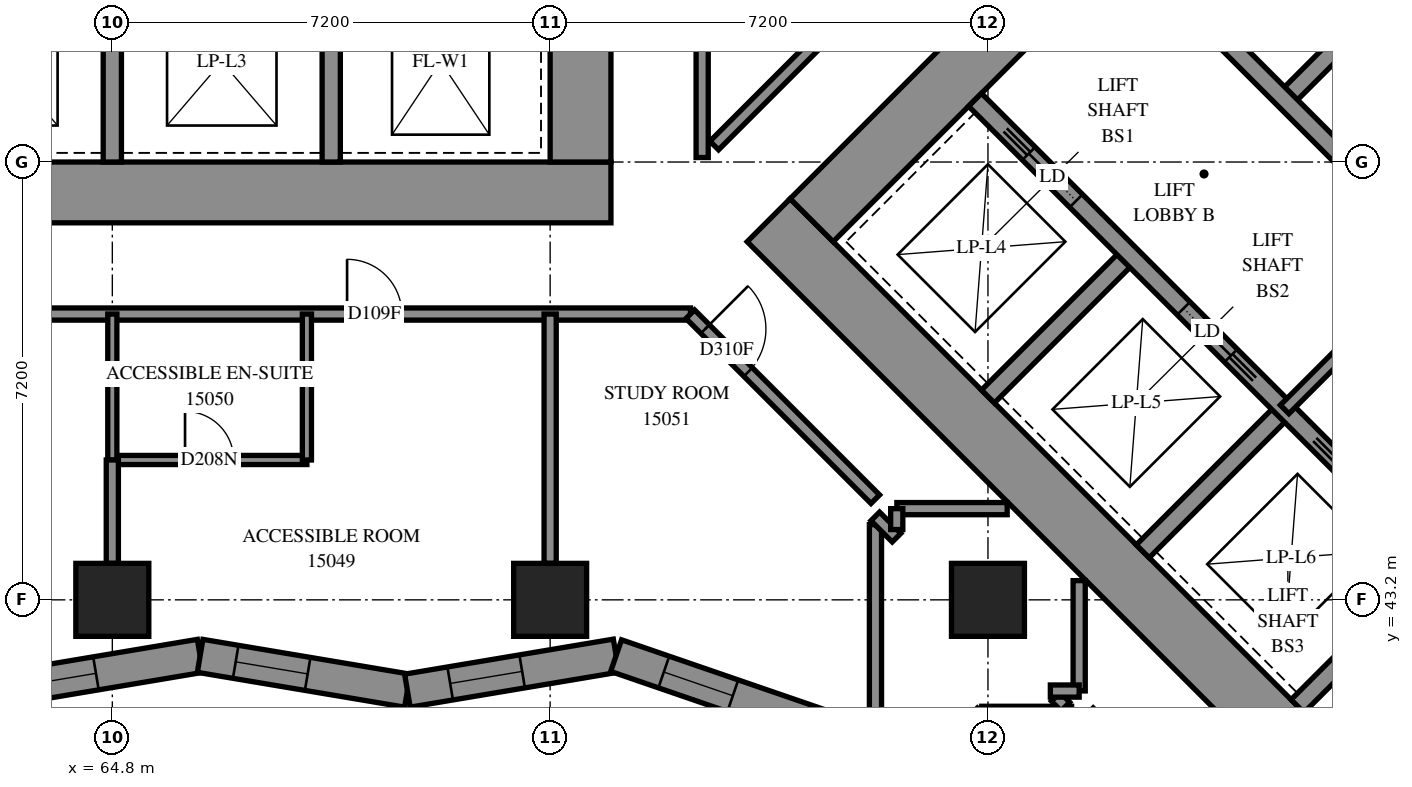
"""IFC4 building model, lengths in metres.
Left out: names, types, materials, properties, quantities, classifications, styles, units other than length and angle.
Written with IfcOpenShell. Run it as: python <this file> out.ifc"""

import sys

from ifc_helpers import new_model, si_unit, direction, frame, frame_2d, origin, origin_2d, place, context, subcontext, project, spatial, polyline, rectangle, outline, extrude, element, fill, save


model = new_model("IFC4")
c1 = context("Model", 3, precision=1e-05, world=origin(), true_north=direction((0.0, 1.0)))
c2 = subcontext(c1, "Body", "Model", "MODEL_VIEW")
j1 = project(units=[si_unit("LENGTHUNIT", "METRE"), si_unit("PLANEANGLEUNIT", "RADIAN")], contexts=[c1])
p1 = place(None, origin())
s1 = spatial("IfcSite", under=j1, at=p1, CompositionType="ELEMENT")
p2 = place(p1, origin())
s2 = spatial("IfcBuilding", under=s1, at=p2, CompositionType="ELEMENT")
p3 = place(p2, frame((0.0, 0.0, 57.6)))
s3 = spatial("IfcBuildingStorey", under=s2, at=p3, CompositionType="ELEMENT", Elevation=57.6)
for number, where, z_axis, x_axis in (
    (1, (64.8, 43.2, 0.0), (0.0, 0.0, 1.0), (1.0, 0.0, 0.0)),
    (2, (72.0, 43.2, 0.0), (0.0, 0.0, 1.0), (1.0, 0.0, 0.0)),
    (3, (79.2, 43.2, 0.0), (0.0, 0.0, 1.0), (1.0, 0.0, 0.0)),
):
    element("IfcColumn", number, at=place(p3, frame(where, z_axis=z_axis, x_axis=x_axis)), inside=s3, PredefinedType="COLUMN", context=c2, shape_type="SweptSolid", body=[
        extrude(rectangle(XDim=1.2, YDim=1.2, at=origin_2d()), origin(), (0.0, 0.0, 1.0), 3.1),
    ])
p4 = place(p3, frame((56.6, 49.9, -0.3), z_axis=(0.0, 0.0, 1.0), x_axis=(1.0, 0.0, 0.0)))
e4 = element("IfcWall", 4, at=p4, inside=s3, PredefinedType="SHEAR", context=c2, shape_type="SweptSolid", body=[
    extrude(rectangle(XDim=16.4, YDim=1.0, at=frame_2d((8.2, 0.0))), origin(), (0.0, 0.0, 1.0), 2.7),
])
p5 = place(p3, frame((72.5, 50.4, -0.3), z_axis=(0.0, 0.0, 1.0), x_axis=(0.0, 1.0, 0.0)))
e5 = element("IfcWall", 5, at=p5, inside=s3, PredefinedType="SHEAR", context=c2, shape_type="SweptSolid", body=[
    extrude(rectangle(XDim=14.4, YDim=1.0, at=frame_2d((7.2, 0.0))), origin(), (0.0, 0.0, 1.0), 2.7),
])
p6 = place(p5, frame((4.55, 0.0, 0.3)))
e6 = element("IfcOpeningElement", 6, at=p6, cuts=e5, PredefinedType="OPENING", context=c2, shape_type="SweptSolid", body=[
    extrude(rectangle(XDim=1.1, YDim=2.1, at=frame_2d((0.55, 1.05))), frame((0.0, 0.51, 0.0), z_axis=(0.0, -1.0, 0.0), x_axis=(1.0, 0.0, 0.0)), (0.0, 0.0, 1.0), 1.02),
])
p7 = place(p5, frame((11.35, 0.0, 0.3)))
e7 = element("IfcOpeningElement", 7, at=p7, cuts=e5, PredefinedType="OPENING", context=c2, shape_type="SweptSolid", body=[
    extrude(rectangle(XDim=1.1, YDim=2.1, at=frame_2d((0.55, 1.05))), frame((0.0, 0.51, 0.0), z_axis=(0.0, -1.0, 0.0), x_axis=(1.0, 0.0, 0.0)), (0.0, 0.0, 1.0), 1.02),
])
for number, where, z_axis, x_axis in (
    (8, (64.8, 50.4, 0.0), (0.0, 0.0, 1.0), (0.0, 1.0, 0.0)),
    (9, (68.4, 50.4, 0.0), (0.0, 0.0, 1.0), (0.0, 1.0, 0.0)),
):
    element("IfcWall", number, at=place(p3, frame(where, z_axis=z_axis, x_axis=x_axis)), inside=s3, PredefinedType="SOLIDWALL", context=c2, shape_type="SweptSolid", body=[
        extrude(rectangle(XDim=3.3, YDim=0.3, at=frame_2d((1.65, 0.0))), origin(), (0.0, 0.0, 1.0), 3.1),
    ])
p8 = place(p3, frame((75.594, 49.443, -0.3), z_axis=(0.0, 0.0, 1.0), x_axis=(0.7071037324, -0.70710983, 0.0)))
e10 = element("IfcWall", 10, at=p8, inside=s3, PredefinedType="SHEAR", context=c2, shape_type="SweptSolid", body=[
    extrude(rectangle(XDim=16.4, YDim=1.0, at=frame_2d((8.2, 0.0))), origin(), (0.0, 0.0, 1.0), 2.7),
])
p9 = place(p3, frame((76.301, 49.443, -0.3), z_axis=(0.0, 0.0, 1.0), x_axis=(0.7071067812, 0.7071067812, 0.0)))
e11 = element("IfcWall", 11, at=p9, inside=s3, PredefinedType="SHEAR", context=c2, shape_type="SweptSolid", body=[
    extrude(rectangle(XDim=14.4, YDim=1.0, at=frame_2d((7.2, 0.0))), origin(), (0.0, 0.0, 1.0), 2.7),
])
p10 = place(p9, frame((4.55, 0.0, 0.3)))
e12 = element("IfcOpeningElement", 12, at=p10, cuts=e11, PredefinedType="OPENING", context=c2, shape_type="SweptSolid", body=[
    extrude(rectangle(XDim=1.1, YDim=2.1, at=frame_2d((0.55, 1.05))), frame((0.0, 0.51, 0.0), z_axis=(0.0, -1.0, 0.0), x_axis=(1.0, 0.0, 0.0)), (0.0, 0.0, 1.0), 1.02),
])
p11 = place(p9, frame((11.35, 0.0, 0.3)))
e13 = element("IfcOpeningElement", 13, at=p11, cuts=e11, PredefinedType="OPENING", context=c2, shape_type="SweptSolid", body=[
    extrude(rectangle(XDim=1.1, YDim=2.1, at=frame_2d((0.55, 1.05))), frame((0.0, 0.51, 0.0), z_axis=(0.0, -1.0, 0.0), x_axis=(1.0, 0.0, 0.0)), (0.0, 0.0, 1.0), 1.02),
])
for number, where, z_axis, x_axis in (
    (14, (79.2, 46.544, 0.0), (0.0, 0.0, 1.0), (0.707, 0.707, 0.0)),
    (15, (84.079, 51.423, 0.0), (0.0, 0.0, 1.0), (0.707, 0.707, 0.0)),
):
    element("IfcWall", number, at=place(p3, frame(where, z_axis=z_axis, x_axis=x_axis)), inside=s3, PredefinedType="SOLIDWALL", context=c2, shape_type="SweptSolid", body=[
        extrude(rectangle(XDim=3.3, YDim=0.3, at=frame_2d((1.65, 0.0))), origin(), (0.0, 0.0, 1.0), 3.1),
    ])
for number, where, z_axis, x_axis in (
    (16, (81.746, 43.999, 0.0), (0.0, 0.0, 1.0), (0.707, 0.707, 0.0)),
    (17, (84.291, 41.453, 0.0), (0.0, 0.0, 1.0), (0.707, 0.707, 0.0)),
):
    element("IfcWall", number, at=place(p3, frame(where, z_axis=z_axis, x_axis=x_axis)), inside=s3, PredefinedType="SOLIDWALL", context=c2, shape_type="SweptSolid", body=[
        extrude(rectangle(XDim=3.3, YDim=0.3, at=frame_2d((1.65, 0.0))), origin(), (0.0, 0.0, 1.0), 3.1),
    ])
p12 = place(p3, frame((78.988, 51.423, 0.0), z_axis=(0.0, 0.0, 1.0), x_axis=(0.7071067812, -0.7071067812, 0.0)))
e18 = element("IfcWall", 18, at=p12, inside=s3, PredefinedType="SOLIDWALL", context=c2, shape_type="SweptSolid", body=[
    extrude(rectangle(XDim=14.4, YDim=0.3, at=frame_2d((7.2, 0.0))), origin(), (0.0, 0.0, 1.0), 3.1),
])
p13 = place(p12, frame((1.25, 0.0, 0.0)))
e19 = element("IfcOpeningElement", 19, at=p13, cuts=e18, PredefinedType="OPENING", context=c2, shape_type="SweptSolid", body=[
    extrude(rectangle(XDim=1.1, YDim=2.1, at=frame_2d((0.55, 1.05))), frame((0.0, 0.16, 0.0), z_axis=(0.0, -1.0, 0.0), x_axis=(1.0, 0.0, 0.0)), (0.0, 0.0, 1.0), 0.32),
])
p14 = place(p12, frame((4.85, 0.0, 0.0)))
e20 = element("IfcOpeningElement", 20, at=p14, cuts=e18, PredefinedType="OPENING", context=c2, shape_type="SweptSolid", body=[
    extrude(rectangle(XDim=1.1, YDim=2.1, at=frame_2d((0.55, 1.05))), frame((0.0, 0.16, 0.0), z_axis=(0.0, -1.0, 0.0), x_axis=(1.0, 0.0, 0.0)), (0.0, 0.0, 1.0), 0.32),
])
p15 = place(p12, frame((8.45, 0.0, 0.0)))
e21 = element("IfcOpeningElement", 21, at=p15, cuts=e18, PredefinedType="OPENING", context=c2, shape_type="SweptSolid", body=[
    extrude(rectangle(XDim=1.1, YDim=2.1, at=frame_2d((0.55, 1.05))), frame((0.0, 0.16, 0.0), z_axis=(0.0, -1.0, 0.0), x_axis=(1.0, 0.0, 0.0)), (0.0, 0.0, 1.0), 0.32),
])
p16 = place(p12, frame((12.05, 0.0, 0.0)))
e22 = element("IfcOpeningElement", 22, at=p16, cuts=e18, PredefinedType="OPENING", context=c2, shape_type="SweptSolid", body=[
    extrude(rectangle(XDim=1.1, YDim=2.1, at=frame_2d((0.55, 1.05))), frame((0.0, 0.16, 0.0), z_axis=(0.0, -1.0, 0.0), x_axis=(1.0, 0.0, 0.0)), (0.0, 0.0, 1.0), 0.32),
])
p17 = place(p3, frame((81.534, 53.969, 0.0), z_axis=(0.0, 0.0, 1.0), x_axis=(0.707103309, -0.7071102534, 0.0)))
e23 = element("IfcWall", 23, at=p17, inside=s3, PredefinedType="SOLIDWALL", context=c2, shape_type="SweptSolid", body=[
    extrude(rectangle(XDim=14.4, YDim=0.3, at=frame_2d((7.2, 0.0))), origin(), (0.0, 0.0, 1.0), 3.1),
])
p18 = place(p17, frame((12.05, 0.0, 0.0)))
e24 = element("IfcOpeningElement", 24, at=p18, cuts=e23, PredefinedType="OPENING", context=c2, shape_type="SweptSolid", body=[
    extrude(rectangle(XDim=1.1, YDim=2.1, at=frame_2d((0.55, 1.05))), frame((0.0, 0.16, 0.0), z_axis=(0.0, -1.0, 0.0), x_axis=(1.0, 0.0, 0.0)), (0.0, 0.0, 1.0), 0.32),
])
p19 = place(p3, frame((83.867, 56.302, 0.0), z_axis=(0.0, 0.0, 1.0), x_axis=(0.7071137256, -0.7070998367, 0.0)))
e25 = element("IfcWall", 25, at=p19, inside=s3, PredefinedType="SOLIDWALL", context=c2, shape_type="SweptSolid", body=[
    extrude(rectangle(XDim=7.2, YDim=0.3, at=frame_2d((3.6, 0.0))), origin(), (0.0, 0.0, 1.0), 3.1),
])
p20 = place(p3, frame((62.835, 41.707, 0.0), z_axis=(0.0, 0.0, 1.0), x_axis=(0.9862119159, 0.1654873316, 0.0)))
e26 = element("IfcWall", 26, at=p20, inside=s3, PredefinedType="SOLIDWALL", context=c2, shape_type="SweptSolid", body=[
    extrude(outline(polyline([(-0.046, -0.275), (3.41, -0.275), (3.503, 0.275), (0.046, 0.275), (-0.046, -0.275)])), origin(), (0.0, 0.0, 1.0), 3.1),
])
p21 = place(p20, frame((0.519, 0.0, 0.5)))
e27 = element("IfcOpeningElement", 27, at=p21, cuts=e26, PredefinedType="OPENING", context=c2, shape_type="SweptSolid", body=[
    extrude(rectangle(XDim=1.2, YDim=2.45, at=frame_2d((0.6, 1.225))), frame((0.0, 0.285, 0.0), z_axis=(0.0, -1.0, 0.0), x_axis=(1.0, 0.0, 0.0)), (0.0, 0.0, 1.0), 0.57),
])
p22 = place(p3, frame((66.244, 42.279, 0.0), z_axis=(0.0, 0.0, 1.0), x_axis=(0.9862119159, -0.1654873316, 0.0)))
e28 = element("IfcWall", 28, at=p22, inside=s3, PredefinedType="SOLIDWALL", context=c2, shape_type="SweptSolid", body=[
    extrude(outline(polyline([(0.046, -0.275), (3.503, -0.275), (3.41, 0.275), (-0.046, 0.275), (0.046, -0.275)])), origin(), (0.0, 0.0, 1.0), 3.1),
])
p23 = place(p22, frame((0.593, 0.0, 0.5)))
e29 = element("IfcOpeningElement", 29, at=p23, cuts=e28, PredefinedType="OPENING", context=c2, shape_type="SweptSolid", body=[
    extrude(rectangle(XDim=1.2, YDim=2.45, at=frame_2d((0.6, 1.225))), frame((0.0, 0.285, 0.0), z_axis=(0.0, -1.0, 0.0), x_axis=(1.0, 0.0, 0.0)), (0.0, 0.0, 1.0), 0.57),
])
p24 = place(p3, frame((69.653, 41.707, 0.0), z_axis=(0.0, 0.0, 1.0), x_axis=(0.9862084709, 0.1655078606, 0.0)))
e30 = element("IfcWall", 30, at=p24, inside=s3, PredefinedType="SOLIDWALL", context=c2, shape_type="SweptSolid", body=[
    extrude(outline(polyline([(-0.046, -0.275), (3.41, -0.275), (3.55, 0.275), (0.046, 0.275), (-0.046, -0.275)])), origin(), (0.0, 0.0, 1.0), 3.1),
])
p25 = place(p24, frame((0.713, 0.0, 0.5)))
e31 = element("IfcOpeningElement", 31, at=p25, cuts=e30, PredefinedType="OPENING", context=c2, shape_type="SweptSolid", body=[
    extrude(rectangle(XDim=1.2, YDim=2.45, at=frame_2d((0.6, 1.225))), frame((0.0, 0.285, 0.0), z_axis=(0.0, -1.0, 0.0), x_axis=(1.0, 0.0, 0.0)), (0.0, 0.0, 1.0), 0.57),
])
p26 = place(p3, frame((73.085, 42.283, 0.0), z_axis=(0.0, 0.0, 1.0), x_axis=(0.9456655462, -0.3251410075, 0.0)))
e32 = element("IfcWall", 32, at=p26, inside=s3, PredefinedType="SOLIDWALL", context=c2, shape_type="SweptSolid", body=[
    extrude(outline(polyline([(0.07, -0.275), (3.675, -0.275), (3.719, 0.275), (-0.07, 0.275), (0.07, -0.275)])), origin(), (0.0, 0.0, 1.0), 3.1),
])
p27 = place(p26, frame((0.83, 0.0, 0.5)))
e33 = element("IfcOpeningElement", 33, at=p27, cuts=e32, PredefinedType="OPENING", context=c2, shape_type="SweptSolid", body=[
    extrude(rectangle(XDim=1.2, YDim=2.45, at=frame_2d((0.6, 1.225))), frame((0.0, 0.285, 0.0), z_axis=(0.0, -1.0, 0.0), x_axis=(1.0, 0.0, 0.0)), (0.0, 0.0, 1.0), 0.57),
])
p28 = place(p3, frame((84.079, 46.332, 0.0), z_axis=(0.0, 0.0, 1.0), x_axis=(0.7071067812, 0.7071067812, 0.0)))
e34 = element("IfcWall", 34, at=p28, inside=s3, PredefinedType="PARTITIONING", context=c2, shape_type="SweptSolid", body=[
    extrude(rectangle(XDim=3.6, YDim=0.2, at=frame_2d((1.8, 0.0))), origin(), (0.0, 0.0, 1.0), 3.1),
])
p29 = place(p3, frame((55.1, 47.9, 0.0), z_axis=(0.0, 0.0, 1.0), x_axis=(1.0, 0.0, 0.0)))
e35 = element("IfcWall", 35, at=p29, inside=s3, PredefinedType="PARTITIONING", context=c2, shape_type="SweptSolid", body=[
    extrude(rectangle(XDim=19.208, YDim=0.2, at=frame_2d((9.604, 0.0))), origin(), (0.0, 0.0, 1.0), 3.1),
])
p30 = place(p29, frame((6.399, 0.0, 0.0)))
e36 = element("IfcOpeningElement", 36, at=p30, cuts=e35, PredefinedType="OPENING", context=c2, shape_type="SweptSolid", body=[
    extrude(rectangle(XDim=0.9, YDim=2.1, at=frame_2d((0.45, 1.05))), frame((0.0, 0.11, 0.0), z_axis=(0.0, -1.0, 0.0), x_axis=(1.0, 0.0, 0.0)), (0.0, 0.0, 1.0), 0.22),
])
p31 = place(p29, frame((13.561, 0.0, 0.0)))
e37 = element("IfcOpeningElement", 37, at=p31, cuts=e35, PredefinedType="OPENING", context=c2, shape_type="SweptSolid", body=[
    extrude(rectangle(XDim=0.9, YDim=2.1, at=frame_2d((0.45, 1.05))), frame((0.0, 0.11, 0.0), z_axis=(0.0, -1.0, 0.0), x_axis=(1.0, 0.0, 0.0)), (0.0, 0.0, 1.0), 0.22),
])
p32 = place(p3, frame((74.699, 50.671, 0.0), z_axis=(0.0, 0.0, 1.0), x_axis=(0.7071067812, 0.7071067812, 0.0)))
e38 = element("IfcWall", 38, at=p32, inside=s3, PredefinedType="PARTITIONING", context=c2, shape_type="SweptSolid", body=[
    extrude(rectangle(XDim=5.131, YDim=0.2, at=frame_2d((2.565, 0.0))), origin(), (0.0, 0.0, 1.0), 3.1),
])
p33 = place(p3, frame((74.305, 47.897, 0.0), z_axis=(0.0, 0.0, 1.0), x_axis=(0.7071067812, -0.7071067812, 0.0)))
e39 = element("IfcWall", 39, at=p33, inside=s3, PredefinedType="PARTITIONING", context=c2, shape_type="SweptSolid", body=[
    extrude(rectangle(XDim=4.302, YDim=0.2, at=frame_2d((2.151, 0.0))), origin(), (0.0, 0.0, 1.0), 3.1),
])
p34 = place(p33, frame((0.345, 0.0, 0.0)))
e40 = element("IfcOpeningElement", 40, at=p34, cuts=e39, PredefinedType="OPENING", context=c2, shape_type="SweptSolid", body=[
    extrude(rectangle(XDim=1.0, YDim=2.1, at=frame_2d((0.5, 1.05))), frame((0.0, 0.11, 0.0), z_axis=(0.0, -1.0, 0.0), x_axis=(1.0, 0.0, 0.0)), (0.0, 0.0, 1.0), 0.22),
])
p35 = place(p3, frame((72.0, 43.8, 0.0), z_axis=(0.0, 0.0, 1.0), x_axis=(0.0, 1.0, 0.0)))
e41 = element("IfcWall", 41, at=p35, inside=s3, PredefinedType="PARTITIONING", context=c2, shape_type="SweptSolid", body=[
    extrude(rectangle(XDim=4.1, YDim=0.2, at=frame_2d((2.05, 0.0))), origin(), (0.0, 0.0, 1.0), 3.1),
])
p36 = place(p3, frame((74.5, 50.474, 0.0), z_axis=(0.0, 0.0, 1.0), x_axis=(0.0, 1.0, 0.0)))
e42 = element("IfcWall", 42, at=p36, inside=s3, PredefinedType="PARTITIONING", context=c2, shape_type="SweptSolid", body=[
    extrude(rectangle(XDim=3.826, YDim=0.2, at=frame_2d((1.913, 0.0))), origin(), (0.0, 0.0, 1.0), 3.1),
])
p37 = place(p3, frame((77.35, 40.981, 0.0), z_axis=(0.0, 0.0, 1.0), x_axis=(0.0, 1.0, 0.0)))
e43 = element("IfcWall", 43, at=p37, inside=s3, PredefinedType="PARTITIONING", context=c2, shape_type="SweptSolid", body=[
    extrude(rectangle(XDim=3.455, YDim=0.2, at=frame_2d((1.727, 0.0))), origin(), (0.0, 0.0, 1.0), 3.1),
])
p38 = place(p3, frame((64.8, 45.5, 0.0), z_axis=(0.0, 0.0, 1.0), x_axis=(1.0, 0.0, 0.0)))
e44 = element("IfcWall", 44, at=p38, inside=s3, PredefinedType="PARTITIONING", context=c2, shape_type="SweptSolid", body=[
    extrude(rectangle(XDim=3.2, YDim=0.15, at=frame_2d((1.6, 0.0))), origin(), (0.0, 0.0, 1.0), 3.1),
])
p39 = place(p38, frame((1.196, 0.0, 0.0)))
e45 = element("IfcOpeningElement", 45, at=p39, cuts=e44, PredefinedType="OPENING", context=c2, shape_type="SweptSolid", body=[
    extrude(rectangle(XDim=0.8, YDim=2.1, at=frame_2d((0.4, 1.05))), frame((0.0, 0.085, 0.0), z_axis=(0.0, -1.0, 0.0), x_axis=(1.0, 0.0, 0.0)), (0.0, 0.0, 1.0), 0.17),
])
for number, where, z_axis, x_axis in (
    (46, (68.0, 45.5, 0.0), (0.0, 0.0, 1.0), (0.0, 1.0, 0.0)),
    (47, (64.8, 45.5, 0.0), (0.0, 0.0, 1.0), (0.0, 1.0, 0.0)),
):
    element("IfcWall", number, at=place(p3, frame(where, z_axis=z_axis, x_axis=x_axis)), inside=s3, PredefinedType="PARTITIONING", context=c2, shape_type="SweptSolid", body=[
        extrude(rectangle(XDim=2.4, YDim=0.15, at=frame_2d((1.2, 0.0))), origin(), (0.0, 0.0, 1.0), 3.1),
    ])
for number, where, z_axis, x_axis in (
    (48, (77.702, 44.7, 0.0), (0.0, 0.0, 1.0), (1.0, 0.0, 0.0)),
    (49, (80.7, 41.702, 0.0), (0.0, 0.0, 1.0), (0.0, 1.0, 0.0)),
):
    element("IfcWall", number, at=place(p3, frame(where, z_axis=z_axis, x_axis=x_axis)), inside=s3, PredefinedType="PARTITIONING", context=c2, shape_type="SweptSolid", body=[
        extrude(rectangle(XDim=1.814, YDim=0.2, at=frame_2d((0.907, 0.0))), origin(), (0.0, 0.0, 1.0), 3.1),
    ])
p40 = place(p3, frame((64.8, 43.8, 0.0), z_axis=(0.0, 0.0, 1.0), x_axis=(0.0, 1.0, 0.0)))
e50 = element("IfcWall", 50, at=p40, inside=s3, PredefinedType="PARTITIONING", context=c2, shape_type="SweptSolid", body=[
    extrude(rectangle(XDim=1.7, YDim=0.2, at=frame_2d((0.85, 0.0))), origin(), (0.0, 0.0, 1.0), 3.1),
])
p41 = place(p3, frame((79.098, 41.35, 0.0), z_axis=(0.0, 0.0, 1.0), x_axis=(1.0, 0.0, 0.0)))
e51 = element("IfcWall", 51, at=p41, inside=s3, PredefinedType="PARTITIONING", context=c2, shape_type="SweptSolid", body=[
    extrude(rectangle(XDim=1.478, YDim=0.2, at=frame_2d((0.739, 0.0))), origin(), (0.0, 0.0, 1.0), 3.1),
])
p42 = place(p3, frame((77.347, 44.573, 0.0), z_axis=(0.0, 0.0, 1.0), x_axis=(0.7071067812, -0.7071067812, 0.0)))
e52 = element("IfcWall", 52, at=p42, inside=s3, PredefinedType="PARTITIONING", context=c2, shape_type="SweptSolid", body=[
    extrude(rectangle(XDim=0.495, YDim=0.2, at=frame_2d((0.247, 0.0))), origin(), (0.0, 0.0, 1.0), 3.1),
])
p43 = place(p3, frame((80.315, 41.605, 0.0), z_axis=(0.0, 0.0, 1.0), x_axis=(0.7071067812, -0.7071067812, 0.0)))
e53 = element("IfcWall", 53, at=p43, inside=s3, PredefinedType="PARTITIONING", context=c2, shape_type="SweptSolid", body=[
    extrude(rectangle(XDim=0.225, YDim=0.2, at=frame_2d((0.113, 0.0))), origin(), (0.0, 0.0, 1.0), 3.1),
])
p44 = place(p3, frame((77.7, 44.356, 0.0), z_axis=(0.0, 0.0, 1.0), x_axis=(0.0, 1.0, 0.0)))
e54 = element("IfcWall", 54, at=p44, inside=s3, PredefinedType="PARTITIONING", context=c2, shape_type="SweptSolid", body=[
    extrude(rectangle(XDim=0.344, YDim=0.2, at=frame_2d((0.172, 0.0))), origin(), (0.0, 0.0, 1.0), 3.1),
])
p45 = place(p3, frame((80.226, 41.7, 0.0), z_axis=(0.0, 0.0, 1.0), x_axis=(1.0, 0.0, 0.0)))
e55 = element("IfcWall", 55, at=p45, inside=s3, PredefinedType="PARTITIONING", context=c2, shape_type="SweptSolid", body=[
    extrude(rectangle(XDim=0.474, YDim=0.2, at=frame_2d((0.237, 0.0))), origin(), (0.0, 0.0, 1.0), 3.1),
])
p46 = place(p21, origin())
e56 = element("IfcWindow", 56, at=p46, inside=s3, PartitioningType="SINGLE_PANEL", PredefinedType="WINDOW", context=c2, shape_type="SweptSolid", body=[
    extrude(rectangle(XDim=1.2, YDim=2.45, at=frame_2d((0.6, 1.225))), frame((0.0, 0.155, 0.0), z_axis=(0.0, -1.0, 0.0), x_axis=(1.0, 0.0, 0.0)), (0.0, 0.0, 1.0), 0.06),
])
fill(e27, e56)
p47 = place(p23, origin())
e57 = element("IfcWindow", 57, at=p47, inside=s3, PartitioningType="SINGLE_PANEL", PredefinedType="WINDOW", context=c2, shape_type="SweptSolid", body=[
    extrude(rectangle(XDim=1.2, YDim=2.45, at=frame_2d((0.6, 1.225))), frame((0.0, 0.155, 0.0), z_axis=(0.0, -1.0, 0.0), x_axis=(1.0, 0.0, 0.0)), (0.0, 0.0, 1.0), 0.06),
])
fill(e29, e57)
p48 = place(p25, origin())
e58 = element("IfcWindow", 58, at=p48, inside=s3, PartitioningType="SINGLE_PANEL", PredefinedType="WINDOW", context=c2, shape_type="SweptSolid", body=[
    extrude(rectangle(XDim=1.2, YDim=2.45, at=frame_2d((0.6, 1.225))), frame((0.0, 0.155, 0.0), z_axis=(0.0, -1.0, 0.0), x_axis=(1.0, 0.0, 0.0)), (0.0, 0.0, 1.0), 0.06),
])
fill(e31, e58)
p49 = place(p27, origin())
e59 = element("IfcWindow", 59, at=p49, inside=s3, PartitioningType="SINGLE_PANEL", PredefinedType="WINDOW", context=c2, shape_type="SweptSolid", body=[
    extrude(rectangle(XDim=1.2, YDim=2.45, at=frame_2d((0.6, 1.225))), frame((0.0, 0.155, 0.0), z_axis=(0.0, -1.0, 0.0), x_axis=(1.0, 0.0, 0.0)), (0.0, 0.0, 1.0), 0.06),
])
fill(e33, e59)
p50 = place(p13, origin())
e60 = element("IfcDoor", 60, at=p50, inside=s3, OperationType="SLIDING_TO_LEFT", PredefinedType="DOOR", context=c2, shape_type="SweptSolid", body=[
    extrude(rectangle(XDim=1.1, YDim=2.1, at=frame_2d((0.55, 1.05))), frame((0.0, 0.025, 0.0), z_axis=(0.0, -1.0, 0.0), x_axis=(1.0, 0.0, 0.0)), (0.0, 0.0, 1.0), 0.05),
])
fill(e19, e60)
p51 = place(p14, origin())
e61 = element("IfcDoor", 61, at=p51, inside=s3, OperationType="SLIDING_TO_RIGHT", PredefinedType="DOOR", context=c2, shape_type="SweptSolid", body=[
    extrude(rectangle(XDim=1.1, YDim=2.1, at=frame_2d((0.55, 1.05))), frame((0.0, 0.025, 0.0), z_axis=(0.0, -1.0, 0.0), x_axis=(1.0, 0.0, 0.0)), (0.0, 0.0, 1.0), 0.05),
])
fill(e20, e61)
p52 = place(p31, origin())
e62 = element("IfcDoor", 62, at=p52, inside=s3, OperationType="SINGLE_SWING_LEFT", PredefinedType="DOOR", context=c2, shape_type="SweptSolid", body=[
    extrude(rectangle(XDim=0.9, YDim=2.1, at=frame_2d((0.45, 1.05))), frame((0.0, 0.025, 0.0), z_axis=(0.0, -1.0, 0.0), x_axis=(1.0, 0.0, 0.0)), (0.0, 0.0, 1.0), 0.05),
])
fill(e37, e62)
p53 = place(p39, origin())
e63 = element("IfcDoor", 63, at=p53, inside=s3, OperationType="SINGLE_SWING_RIGHT", PredefinedType="DOOR", context=c2, shape_type="SweptSolid", body=[
    extrude(rectangle(XDim=0.8, YDim=2.1, at=frame_2d((0.4, 1.05))), frame((0.0, 0.025, 0.0), z_axis=(0.0, -1.0, 0.0), x_axis=(1.0, 0.0, 0.0)), (0.0, 0.0, 1.0), 0.05),
])
fill(e45, e63)
p54 = place(p34, origin())
e64 = element("IfcDoor", 64, at=p54, inside=s3, OperationType="SINGLE_SWING_LEFT", PredefinedType="DOOR", context=c2, shape_type="SweptSolid", body=[
    extrude(rectangle(XDim=1.0, YDim=2.1, at=frame_2d((0.5, 1.05))), frame((0.0, 0.025, 0.0), z_axis=(0.0, -1.0, 0.0), x_axis=(1.0, 0.0, 0.0)), (0.0, 0.0, 1.0), 0.05),
])
fill(e40, e64)
save(model, sys.argv[1])
